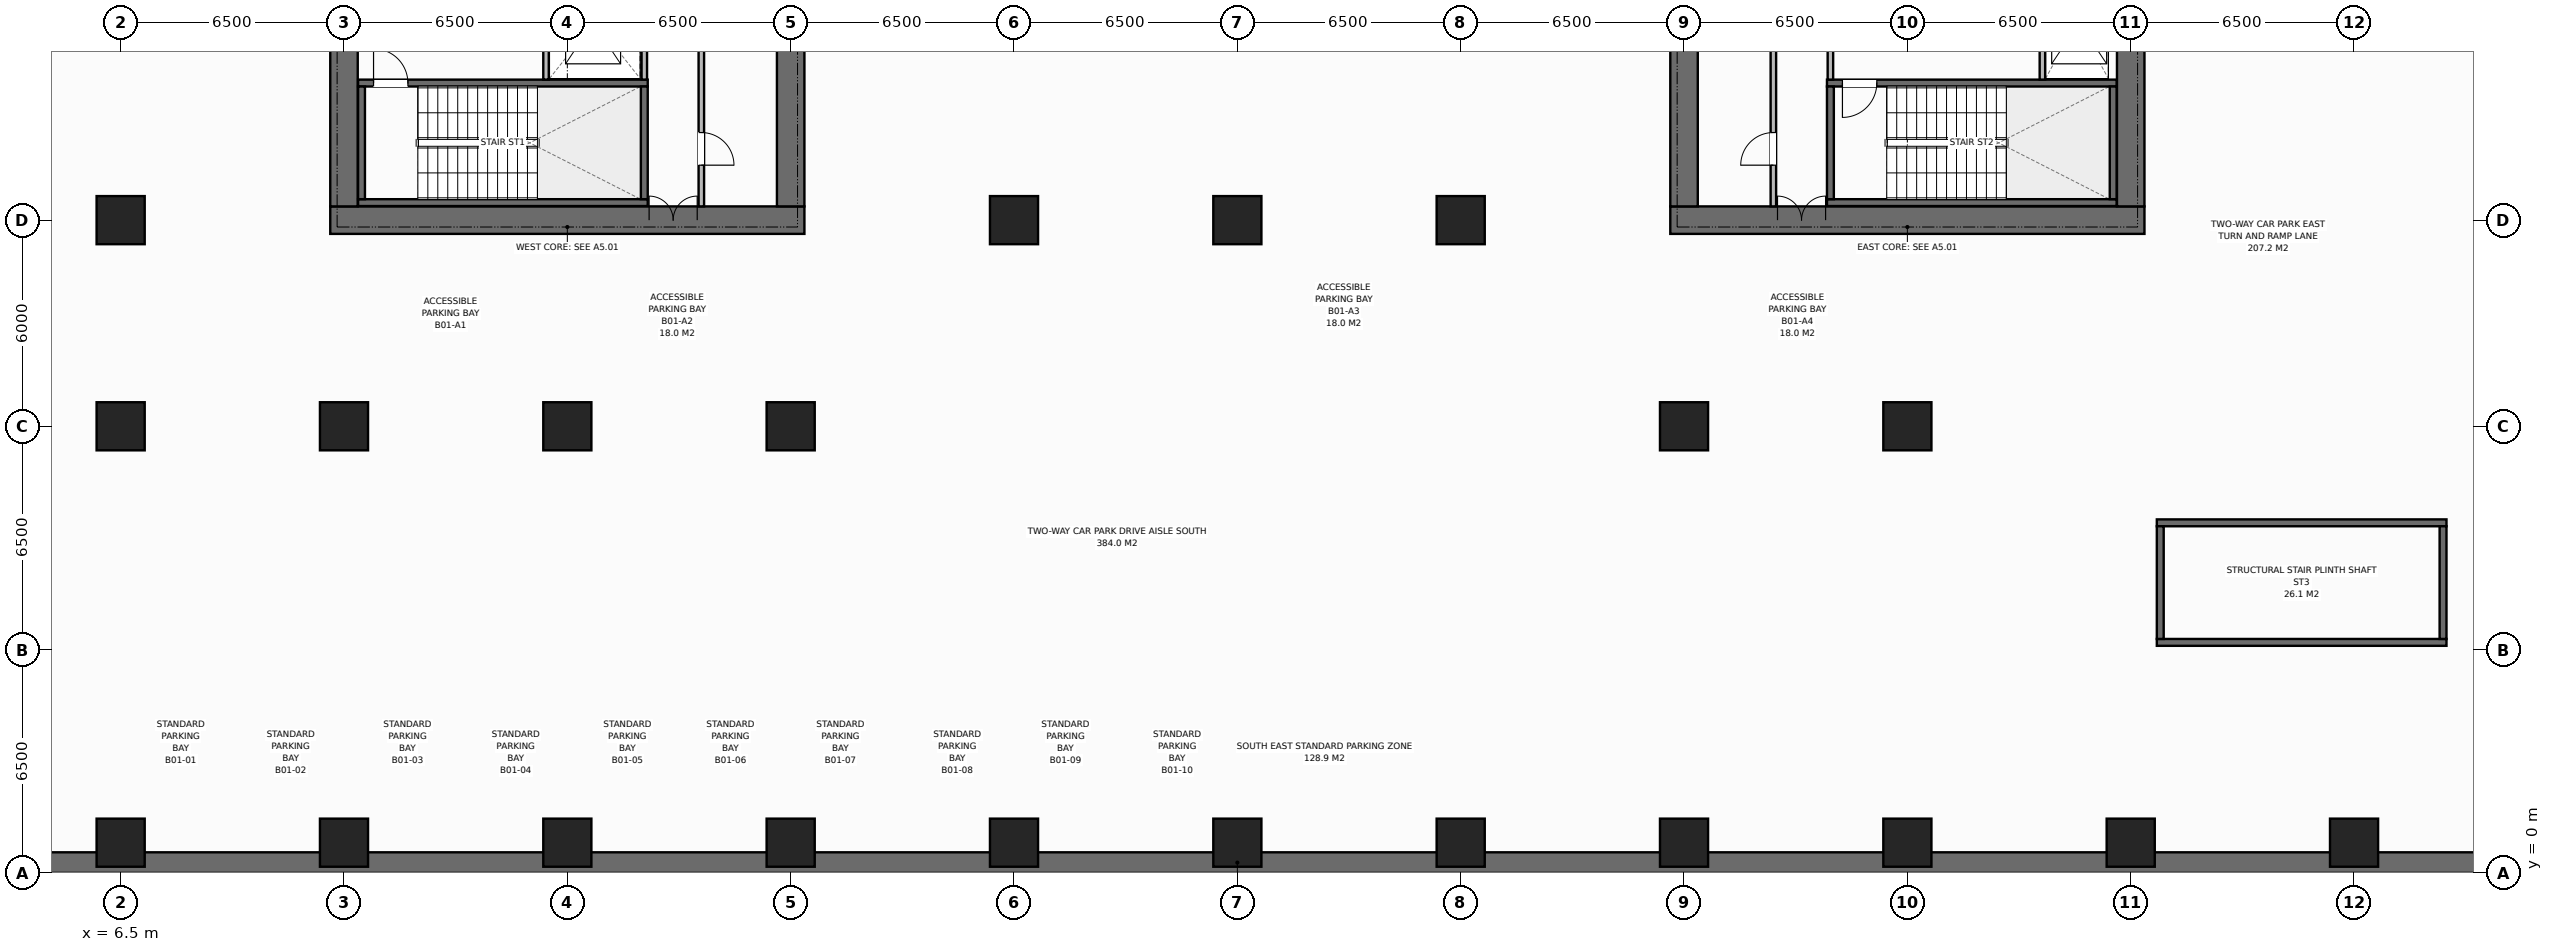
"""IFC4 building model, lengths in metres.
Left out: names, types, materials, properties, quantities, classifications, styles, units other than length and angle.
Written with IfcOpenShell. Run it as: python <this file> out.ifc"""

import sys

from ifc_helpers import new_model, si_unit, direction, frame, frame_2d, origin, origin_2d, place, context, subcontext, project, spatial, rectangle, extrude, element, fill, save


model = new_model("IFC4")
c1 = context("Model", 3, precision=1e-05, world=origin(), true_north=direction((0.0, 1.0)))
c2 = subcontext(c1, "Body", "Model", "MODEL_VIEW")
j1 = project(units=[si_unit("LENGTHUNIT", "METRE"), si_unit("PLANEANGLEUNIT", "RADIAN")], contexts=[c1])
p1 = place(None, origin())
s1 = spatial("IfcSite", under=j1, at=p1, CompositionType="ELEMENT")
p2 = place(p1, origin())
s2 = spatial("IfcBuilding", under=s1, at=p2, CompositionType="ELEMENT")
p3 = place(p2, frame((0.0, 0.0, -4.5)))
s3 = spatial("IfcBuildingStorey", under=s2, at=p3, CompositionType="ELEMENT", Elevation=-4.5)
p4 = place(p3, frame((-0.2, 0.3, 0.0), z_axis=(0.0, 0.0, 1.0), x_axis=(1.0, 0.0, 0.0)))
e1 = element("IfcWall", 1, at=p4, inside=s3, PredefinedType="USERDEFINED", context=c2, shape_type="SweptSolid", body=[
    extrude(rectangle(XDim=78.4, YDim=0.6, at=frame_2d((39.2, 0.0))), origin(), (0.0, 0.0, 1.0), 4.22),
])
p5 = place(p3, frame((12.6, 19.0, 0.0), z_axis=(0.0, 0.0, 1.0), x_axis=(1.0, 0.0, 0.0)))
e2 = element("IfcWall", 2, at=p5, inside=s3, PredefinedType="SHEAR", context=c2, shape_type="SweptSolid", body=[
    extrude(rectangle(XDim=13.8, YDim=0.8, at=frame_2d((6.9, 0.0))), origin(), (0.0, 0.0, 1.0), 4.5),
])
p6 = place(p5, frame((9.28, 0.0, 0.0)))
e3 = element("IfcOpeningElement", 3, at=p6, cuts=e2, PredefinedType="OPENING", context=c2, shape_type="SweptSolid", body=[
    extrude(rectangle(XDim=1.4, YDim=2.2, at=frame_2d((0.7, 1.1))), frame((0.0, 0.41, 0.0), z_axis=(0.0, -1.0, 0.0), x_axis=(1.0, 0.0, 0.0)), (0.0, 0.0, 1.0), 0.82),
])
p7 = place(p3, frame((13.0, 19.4, 0.0), z_axis=(0.0, 0.0, 1.0), x_axis=(0.0, 1.0, 0.0)))
e4 = element("IfcWall", 4, at=p7, inside=s3, PredefinedType="SHEAR", context=c2, shape_type="SweptSolid", body=[
    extrude(rectangle(XDim=13.2, YDim=0.8, at=frame_2d((6.6, 0.0))), origin(), (0.0, 0.0, 1.0), 4.5),
])
p8 = place(p7, frame((4.65, 0.0, 0.0)))
e5 = element("IfcOpeningElement", 5, at=p8, cuts=e4, PredefinedType="OPENING", context=c2, shape_type="SweptSolid", body=[
    extrude(rectangle(XDim=1.4, YDim=2.2, at=frame_2d((0.7, 1.1))), frame((0.0, 0.41, 0.0), z_axis=(0.0, -1.0, 0.0), x_axis=(1.0, 0.0, 0.0)), (0.0, 0.0, 1.0), 0.82),
])
p9 = place(p3, frame((26.0, 19.4, 0.0), z_axis=(0.0, 0.0, 1.0), x_axis=(0.0, 1.0, 0.0)))
e6 = element("IfcWall", 6, at=p9, inside=s3, PredefinedType="SHEAR", context=c2, shape_type="SweptSolid", body=[
    extrude(rectangle(XDim=13.2, YDim=0.8, at=frame_2d((6.6, 0.0))), origin(), (0.0, 0.0, 1.0), 4.5),
])
p10 = place(p3, frame((51.6, 19.0, 0.0), z_axis=(0.0, 0.0, 1.0), x_axis=(1.0, 0.0, 0.0)))
e7 = element("IfcWall", 7, at=p10, inside=s3, PredefinedType="SHEAR", context=c2, shape_type="SweptSolid", body=[
    extrude(rectangle(XDim=13.8, YDim=0.8, at=frame_2d((6.9, 0.0))), origin(), (0.0, 0.0, 1.0), 4.5),
])
p11 = place(p10, frame((3.12, 0.0, 0.0)))
e8 = element("IfcOpeningElement", 8, at=p11, cuts=e7, PredefinedType="OPENING", context=c2, shape_type="SweptSolid", body=[
    extrude(rectangle(XDim=1.4, YDim=2.2, at=frame_2d((0.7, 1.1))), frame((0.0, 0.41, 0.0), z_axis=(0.0, -1.0, 0.0), x_axis=(1.0, 0.0, 0.0)), (0.0, 0.0, 1.0), 0.82),
])
p12 = place(p3, frame((52.0, 19.4, 0.0), z_axis=(0.0, 0.0, 1.0), x_axis=(0.0, 1.0, 0.0)))
e9 = element("IfcWall", 9, at=p12, inside=s3, PredefinedType="SHEAR", context=c2, shape_type="SweptSolid", body=[
    extrude(rectangle(XDim=13.2, YDim=0.8, at=frame_2d((6.6, 0.0))), origin(), (0.0, 0.0, 1.0), 4.5),
])
p13 = place(p3, frame((65.0, 19.4, 0.0), z_axis=(0.0, 0.0, 1.0), x_axis=(0.0, 1.0, 0.0)))
e10 = element("IfcWall", 10, at=p13, inside=s3, PredefinedType="SHEAR", context=c2, shape_type="SweptSolid", body=[
    extrude(rectangle(XDim=13.2, YDim=0.8, at=frame_2d((6.6, 0.0))), origin(), (0.0, 0.0, 1.0), 4.5),
])
p14 = place(p13, frame((8.05, 0.0, 0.0)))
e11 = element("IfcOpeningElement", 11, at=p14, cuts=e10, PredefinedType="OPENING", context=c2, shape_type="SweptSolid", body=[
    extrude(rectangle(XDim=1.3, YDim=2.2, at=frame_2d((0.65, 1.1))), frame((0.0, 0.41, 0.0), z_axis=(0.0, -1.0, 0.0), x_axis=(1.0, 0.0, 0.0)), (0.0, 0.0, 1.0), 0.82),
])
p15 = place(p3, frame((13.41, 19.51, 0.0), z_axis=(0.0, 0.0, 1.0), x_axis=(1.0, 0.0, 0.0)))
e12 = element("IfcWall", 12, at=p15, inside=s3, PredefinedType="SHEAR", context=c2, shape_type="SweptSolid", body=[
    extrude(rectangle(XDim=8.43, YDim=0.2, at=frame_2d((4.215, 0.0))), origin(), (0.0, 0.0, 1.0), 4.5),
])
p16 = place(p3, frame((13.41, 22.99, 0.0), z_axis=(0.0, 0.0, 1.0), x_axis=(1.0, 0.0, 0.0)))
e13 = element("IfcWall", 13, at=p16, inside=s3, PredefinedType="SHEAR", context=c2, shape_type="SweptSolid", body=[
    extrude(rectangle(XDim=8.43, YDim=0.2, at=frame_2d((4.215, 0.0))), origin(), (0.0, 0.0, 1.0), 4.5),
])
p17 = place(p16, frame((0.45, 0.0, 0.0)))
e14 = element("IfcOpeningElement", 14, at=p17, cuts=e13, PredefinedType="OPENING", context=c2, shape_type="SweptSolid", body=[
    extrude(rectangle(XDim=1.0, YDim=2.15, at=frame_2d((0.5, 1.075))), frame((0.0, 0.11, 0.0), z_axis=(0.0, -1.0, 0.0), x_axis=(1.0, 0.0, 0.0)), (0.0, 0.0, 1.0), 0.22),
])
for number, where, z_axis, x_axis in (
    (15, (13.51, 19.61, 0.0), (0.0, 0.0, 1.0), (0.0, 1.0, 0.0)),
    (16, (21.74, 19.61, 0.0), (0.0, 0.0, 1.0), (0.0, 1.0, 0.0)),
):
    element("IfcWall", number, at=place(p3, frame(where, z_axis=z_axis, x_axis=x_axis)), inside=s3, PredefinedType="SHEAR", context=c2, shape_type="SweptSolid", body=[
        extrude(rectangle(XDim=3.28, YDim=0.2, at=frame_2d((1.64, 0.0))), origin(), (0.0, 0.0, 1.0), 4.5),
    ])
p18 = place(p3, frame((56.16, 19.51, 0.0), z_axis=(0.0, 0.0, 1.0), x_axis=(1.0, 0.0, 0.0)))
e17 = element("IfcWall", 17, at=p18, inside=s3, PredefinedType="SHEAR", context=c2, shape_type="SweptSolid", body=[
    extrude(rectangle(XDim=8.43, YDim=0.2, at=frame_2d((4.215, 0.0))), origin(), (0.0, 0.0, 1.0), 4.5),
])
p19 = place(p3, frame((56.16, 22.99, 0.0), z_axis=(0.0, 0.0, 1.0), x_axis=(1.0, 0.0, 0.0)))
e18 = element("IfcWall", 18, at=p19, inside=s3, PredefinedType="SHEAR", context=c2, shape_type="SweptSolid", body=[
    extrude(rectangle(XDim=8.43, YDim=0.2, at=frame_2d((4.215, 0.0))), origin(), (0.0, 0.0, 1.0), 4.5),
])
p20 = place(p19, frame((0.45, 0.0, 0.0)))
e19 = element("IfcOpeningElement", 19, at=p20, cuts=e18, PredefinedType="OPENING", context=c2, shape_type="SweptSolid", body=[
    extrude(rectangle(XDim=1.0, YDim=2.15, at=frame_2d((0.5, 1.075))), frame((0.0, 0.11, 0.0), z_axis=(0.0, -1.0, 0.0), x_axis=(1.0, 0.0, 0.0)), (0.0, 0.0, 1.0), 0.22),
])
for number, where, z_axis, x_axis in (
    (20, (56.26, 19.61, 0.0), (0.0, 0.0, 1.0), (0.0, 1.0, 0.0)),
    (21, (64.49, 19.61, 0.0), (0.0, 0.0, 1.0), (0.0, 1.0, 0.0)),
):
    element("IfcWall", number, at=place(p3, frame(where, z_axis=z_axis, x_axis=x_axis)), inside=s3, PredefinedType="SHEAR", context=c2, shape_type="SweptSolid", body=[
        extrude(rectangle(XDim=3.28, YDim=0.2, at=frame_2d((1.64, 0.0))), origin(), (0.0, 0.0, 1.0), 4.5),
    ])
for number, where, z_axis, x_axis in (
    (22, (65.76, 6.71, 0.0), (0.0, 0.0, 1.0), (1.0, 0.0, 0.0)),
    (23, (65.76, 10.19, 0.0), (0.0, 0.0, 1.0), (1.0, 0.0, 0.0)),
):
    element("IfcWall", number, at=place(p3, frame(where, z_axis=z_axis, x_axis=x_axis)), inside=s3, PredefinedType="SHEAR", context=c2, shape_type="SweptSolid", body=[
        extrude(rectangle(XDim=8.43, YDim=0.2, at=frame_2d((4.215, 0.0))), origin(), (0.0, 0.0, 1.0), 4.5),
    ])
for number, where, z_axis, x_axis in (
    (24, (65.86, 6.81, 0.0), (0.0, 0.0, 1.0), (0.0, 1.0, 0.0)),
    (25, (74.09, 6.81, 0.0), (0.0, 0.0, 1.0), (0.0, 1.0, 0.0)),
):
    element("IfcWall", number, at=place(p3, frame(where, z_axis=z_axis, x_axis=x_axis)), inside=s3, PredefinedType="SHEAR", context=c2, shape_type="SweptSolid", body=[
        extrude(rectangle(XDim=3.28, YDim=0.2, at=frame_2d((1.64, 0.0))), origin(), (0.0, 0.0, 1.0), 4.5),
    ])
for number, where, z_axis, x_axis in (
    (26, (58.5, 13.0, 0.0), (0.0, 0.0, 1.0), (1.0, 0.0, 0.0)),
    (27, (6.5, 19.0, 0.0), (0.0, 0.0, 1.0), (1.0, 0.0, 0.0)),
    (28, (6.5, 13.0, 0.0), (0.0, 0.0, 1.0), (1.0, 0.0, 0.0)),
    (29, (13.0, 13.0, 0.0), (0.0, 0.0, 1.0), (1.0, 0.0, 0.0)),
    (30, (19.5, 13.0, 0.0), (0.0, 0.0, 1.0), (1.0, 0.0, 0.0)),
    (31, (32.5, 19.0, 0.0), (0.0, 0.0, 1.0), (1.0, 0.0, 0.0)),
    (32, (39.0, 19.0, 0.0), (0.0, 0.0, 1.0), (1.0, 0.0, 0.0)),
    (33, (45.5, 19.0, 0.0), (0.0, 0.0, 1.0), (1.0, 0.0, 0.0)),
    (34, (26.0, 13.0, 0.0), (0.0, 0.0, 1.0), (1.0, 0.0, 0.0)),
    (35, (52.0, 13.0, 0.0), (0.0, 0.0, 1.0), (1.0, 0.0, 0.0)),
    (36, (6.5, 0.88, 0.0), (0.0, 0.0, 1.0), (1.0, 0.0, 0.0)),
    (37, (13.0, 0.88, 0.0), (0.0, 0.0, 1.0), (1.0, 0.0, 0.0)),
    (38, (19.5, 0.88, 0.0), (0.0, 0.0, 1.0), (1.0, 0.0, 0.0)),
    (39, (26.0, 0.88, 0.0), (0.0, 0.0, 1.0), (1.0, 0.0, 0.0)),
    (40, (32.5, 0.88, 0.0), (0.0, 0.0, 1.0), (1.0, 0.0, 0.0)),
    (41, (39.0, 0.88, 0.0), (0.0, 0.0, 1.0), (1.0, 0.0, 0.0)),
    (42, (45.5, 0.88, 0.0), (0.0, 0.0, 1.0), (1.0, 0.0, 0.0)),
    (43, (52.0, 0.88, 0.0), (0.0, 0.0, 1.0), (1.0, 0.0, 0.0)),
    (44, (58.5, 0.88, 0.0), (0.0, 0.0, 1.0), (1.0, 0.0, 0.0)),
    (45, (65.0, 0.88, 0.0), (0.0, 0.0, 1.0), (1.0, 0.0, 0.0)),
    (46, (71.5, 0.88, 0.0), (0.0, 0.0, 1.0), (1.0, 0.0, 0.0)),
):
    element("IfcColumn", number, at=place(p3, frame(where, z_axis=z_axis, x_axis=x_axis)), inside=s3, PredefinedType="COLUMN", context=c2, shape_type="SweptSolid", body=[
        extrude(rectangle(XDim=1.4, YDim=1.4, at=origin_2d()), origin(), (0.0, 0.0, 1.0), 4.5),
    ])
p21 = place(p3, frame((21.74, 23.09, 0.0), z_axis=(0.0, 0.0, 1.0), x_axis=(0.0, 1.0, 0.0)))
e47 = element("IfcWall", 47, at=p21, inside=s3, PredefinedType="STANDARD", context=c2, shape_type="SweptSolid", body=[
    extrude(rectangle(XDim=3.47, YDim=0.16, at=frame_2d((1.735, 0.0))), origin(), (0.0, 0.0, 1.0), 4.22),
])
p22 = place(p3, frame((18.88, 23.09, 0.0), z_axis=(0.0, 0.0, 1.0), x_axis=(0.0, 1.0, 0.0)))
e48 = element("IfcWall", 48, at=p22, inside=s3, PredefinedType="STANDARD", context=c2, shape_type="SweptSolid", body=[
    extrude(rectangle(XDim=3.47, YDim=0.16, at=frame_2d((1.735, 0.0))), origin(), (0.0, 0.0, 1.0), 4.22),
])
p23 = place(p22, frame((1.1, 0.0, 0.0)))
e49 = element("IfcOpeningElement", 49, at=p23, cuts=e48, PredefinedType="OPENING", context=c2, shape_type="SweptSolid", body=[
    extrude(rectangle(XDim=1.1, YDim=2.2, at=frame_2d((0.55, 1.1))), frame((0.0, 0.09, 0.0), z_axis=(0.0, -1.0, 0.0), x_axis=(1.0, 0.0, 0.0)), (0.0, 0.0, 1.0), 0.18),
])
p24 = place(p3, frame((23.4, 19.4, 0.0), z_axis=(0.0, 0.0, 1.0), x_axis=(0.0, 1.0, 0.0)))
e50 = element("IfcWall", 50, at=p24, inside=s3, PredefinedType="STANDARD", context=c2, shape_type="SweptSolid", body=[
    extrude(rectangle(XDim=13.2, YDim=0.16, at=frame_2d((6.6, 0.0))), origin(), (0.0, 0.0, 1.0), 4.22),
])
p25 = place(p24, frame((1.2, 0.0, 0.0)))
e51 = element("IfcOpeningElement", 51, at=p25, cuts=e50, PredefinedType="OPENING", context=c2, shape_type="SweptSolid", body=[
    extrude(rectangle(XDim=0.95, YDim=2.15, at=frame_2d((0.475, 1.075))), frame((0.0, 0.09, 0.0), z_axis=(0.0, -1.0, 0.0), x_axis=(1.0, 0.0, 0.0)), (0.0, 0.0, 1.0), 0.18),
])
p26 = place(p3, frame((54.6, 19.4, 0.0), z_axis=(0.0, 0.0, 1.0), x_axis=(0.0, 1.0, 0.0)))
e52 = element("IfcWall", 52, at=p26, inside=s3, PredefinedType="STANDARD", context=c2, shape_type="SweptSolid", body=[
    extrude(rectangle(XDim=13.2, YDim=0.16, at=frame_2d((6.6, 0.0))), origin(), (0.0, 0.0, 1.0), 4.22),
])
p27 = place(p26, frame((1.2, 0.0, 0.0)))
e53 = element("IfcOpeningElement", 53, at=p27, cuts=e52, PredefinedType="OPENING", context=c2, shape_type="SweptSolid", body=[
    extrude(rectangle(XDim=0.95, YDim=2.15, at=frame_2d((0.475, 1.075))), frame((0.0, 0.09, 0.0), z_axis=(0.0, -1.0, 0.0), x_axis=(1.0, 0.0, 0.0)), (0.0, 0.0, 1.0), 0.18),
])
p28 = place(p3, frame((56.26, 23.09, 0.0), z_axis=(0.0, 0.0, 1.0), x_axis=(0.0, 1.0, 0.0)))
e54 = element("IfcWall", 54, at=p28, inside=s3, PredefinedType="STANDARD", context=c2, shape_type="SweptSolid", body=[
    extrude(rectangle(XDim=9.51, YDim=0.16, at=frame_2d((4.755, 0.0))), origin(), (0.0, 0.0, 1.0), 4.22),
])
p29 = place(p28, frame((1.01, 0.0, 0.0)))
e55 = element("IfcOpeningElement", 55, at=p29, cuts=e54, PredefinedType="OPENING", context=c2, shape_type="SweptSolid", body=[
    extrude(rectangle(XDim=1.3, YDim=2.2, at=frame_2d((0.65, 1.1))), frame((0.0, 0.09, 0.0), z_axis=(0.0, -1.0, 0.0), x_axis=(1.0, 0.0, 0.0)), (0.0, 0.0, 1.0), 0.18),
])
p30 = place(p3, frame((62.43, 23.09, 0.0), z_axis=(0.0, 0.0, 1.0), x_axis=(0.0, 1.0, 0.0)))
e56 = element("IfcWall", 56, at=p30, inside=s3, PredefinedType="STANDARD", context=c2, shape_type="SweptSolid", body=[
    extrude(rectangle(XDim=3.47, YDim=0.16, at=frame_2d((1.735, 0.0))), origin(), (0.0, 0.0, 1.0), 4.22),
])
p31 = place(p30, frame((1.1, 0.0, 0.0)))
e57 = element("IfcOpeningElement", 57, at=p31, cuts=e56, PredefinedType="OPENING", context=c2, shape_type="SweptSolid", body=[
    extrude(rectangle(XDim=1.1, YDim=2.2, at=frame_2d((0.55, 1.1))), frame((0.0, 0.09, 0.0), z_axis=(0.0, -1.0, 0.0), x_axis=(1.0, 0.0, 0.0)), (0.0, 0.0, 1.0), 0.18),
])
p32 = place(p17, origin())
e58 = element("IfcDoor", 58, at=p32, inside=s3, OperationType="SINGLE_SWING_LEFT", PredefinedType="DOOR", context=c2, shape_type="SweptSolid", body=[
    extrude(rectangle(XDim=1.0, YDim=2.15, at=frame_2d((0.5, 1.075))), frame((0.0, 0.025, 0.0), z_axis=(0.0, -1.0, 0.0), x_axis=(1.0, 0.0, 0.0)), (0.0, 0.0, 1.0), 0.05),
])
fill(e14, e58)
p33 = place(p6, origin())
e59 = element("IfcDoor", 59, at=p33, inside=s3, OperationType="DOUBLE_DOOR_SINGLE_SWING", PredefinedType="DOOR", context=c2, shape_type="SweptSolid", body=[
    extrude(rectangle(XDim=1.4, YDim=2.2, at=frame_2d((0.7, 1.1))), frame((0.0, 0.125, 0.0), z_axis=(0.0, -1.0, 0.0), x_axis=(1.0, 0.0, 0.0)), (0.0, 0.0, 1.0), 0.05),
])
fill(e3, e59)
p34 = place(p25, origin())
e60 = element("IfcDoor", 60, at=p34, inside=s3, OperationType="SINGLE_SWING_RIGHT", PredefinedType="DOOR", context=c2, shape_type="SweptSolid", body=[
    extrude(rectangle(XDim=0.95, YDim=2.15, at=frame_2d((0.475, 1.075))), frame((0.0, 0.025, 0.0), z_axis=(0.0, -1.0, 0.0), x_axis=(1.0, 0.0, 0.0)), (0.0, 0.0, 1.0), 0.05),
])
fill(e51, e60)
p35 = place(p11, origin())
e61 = element("IfcDoor", 61, at=p35, inside=s3, OperationType="DOUBLE_DOOR_SINGLE_SWING", PredefinedType="DOOR", context=c2, shape_type="SweptSolid", body=[
    extrude(rectangle(XDim=1.4, YDim=2.2, at=frame_2d((0.7, 1.1))), frame((0.0, 0.125, 0.0), z_axis=(0.0, -1.0, 0.0), x_axis=(1.0, 0.0, 0.0)), (0.0, 0.0, 1.0), 0.05),
])
fill(e8, e61)
p36 = place(p27, origin())
e62 = element("IfcDoor", 62, at=p36, inside=s3, OperationType="SINGLE_SWING_LEFT", PredefinedType="DOOR", context=c2, shape_type="SweptSolid", body=[
    extrude(rectangle(XDim=0.95, YDim=2.15, at=frame_2d((0.475, 1.075))), frame((0.0, 0.025, 0.0), z_axis=(0.0, -1.0, 0.0), x_axis=(1.0, 0.0, 0.0)), (0.0, 0.0, 1.0), 0.05),
])
fill(e53, e62)
p37 = place(p20, origin())
e63 = element("IfcDoor", 63, at=p37, inside=s3, OperationType="SINGLE_SWING_RIGHT", PredefinedType="DOOR", context=c2, shape_type="SweptSolid", body=[
    extrude(rectangle(XDim=1.0, YDim=2.15, at=frame_2d((0.5, 1.075))), frame((0.0, 0.025, 0.0), z_axis=(0.0, -1.0, 0.0), x_axis=(1.0, 0.0, 0.0)), (0.0, 0.0, 1.0), 0.05),
])
fill(e19, e63)
save(model, sys.argv[1])
